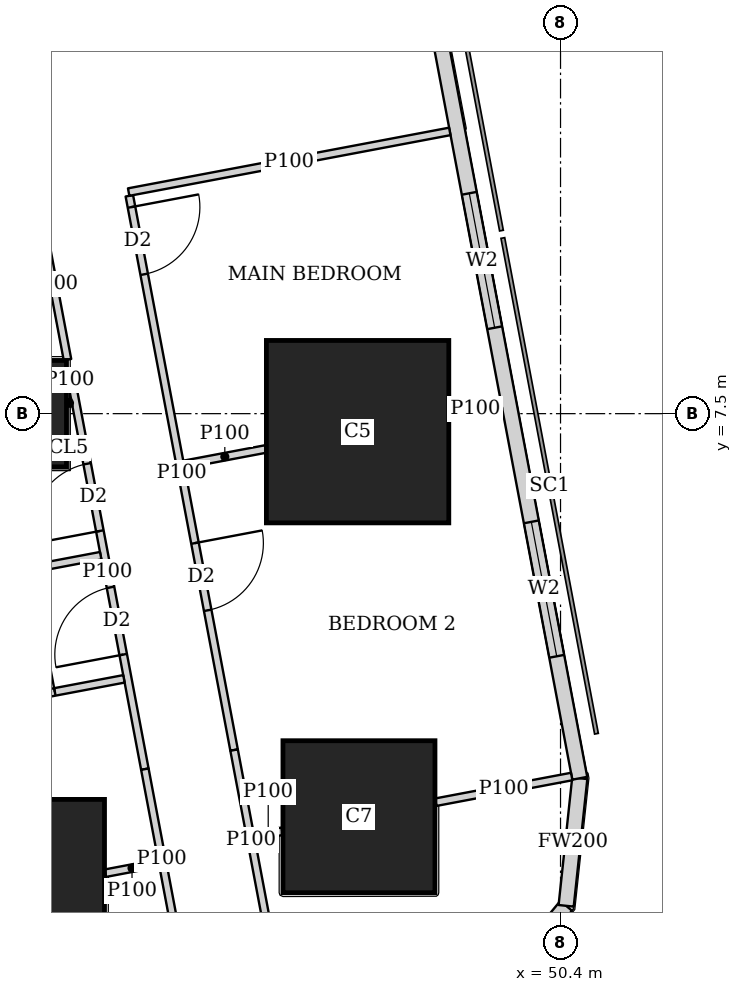
"""IFC4 building model, lengths in metres.
Left out: names, types, materials, properties, quantities, classifications, styles, units other than length and angle.
Written with IfcOpenShell. Run it as: python <this file> out.ifc"""

import sys

from ifc_helpers import new_model, si_unit, direction, frame, frame_2d, origin, origin_2d, place, context, subcontext, project, spatial, rectangle, extrude, element, fill, save


model = new_model("IFC4")
c1 = context("Model", 3, precision=1e-05, world=origin(), true_north=direction((0.0, 1.0)))
c2 = subcontext(c1, "Body", "Model", "MODEL_VIEW")
j1 = project(units=[si_unit("LENGTHUNIT", "METRE"), si_unit("PLANEANGLEUNIT", "RADIAN")], contexts=[c1])
p1 = place(None, origin())
s1 = spatial("IfcSite", under=j1, at=p1, CompositionType="ELEMENT")
p2 = place(p1, origin())
s2 = spatial("IfcBuilding", under=s1, at=p2, CompositionType="ELEMENT")
p3 = place(p2, frame((0.0, 0.0, 204.95)))
s3 = spatial("IfcBuildingStorey", under=s2, at=p3, CompositionType="ELEMENT", Elevation=204.95)
p4 = place(p3, frame((43.2, 1.225, 0.0), z_axis=(0.0, 0.0, 1.0), x_axis=(1.0, 0.0, 0.0)))
e1 = element("IfcColumn", 1, at=p4, inside=s3, PredefinedType="COLUMN", context=c2, shape_type="SweptSolid", body=[
    extrude(rectangle(XDim=2.4, YDim=2.4, at=origin_2d()), origin(), (0.0, 0.0, 1.0), 3.75),
])
p5 = place(p3, frame((47.748, 2.197, 0.0), z_axis=(0.0, 0.0, 1.0), x_axis=(1.0, 0.0, 0.0)))
e2 = element("IfcColumn", 2, at=p5, inside=s3, PredefinedType="COLUMN", context=c2, shape_type="SweptSolid", body=[
    extrude(rectangle(XDim=2.0, YDim=2.0, at=origin_2d()), origin(), (0.0, 0.0, 1.0), 3.75),
])
p6 = place(p3, frame((43.2, 7.5, 0.0), z_axis=(0.0, 0.0, 1.0), x_axis=(1.0, 0.0, 0.0)))
e3 = element("IfcColumn", 3, at=p6, inside=s3, PredefinedType="COLUMN", context=c2, shape_type="SweptSolid", body=[
    extrude(rectangle(XDim=1.4, YDim=1.4, at=origin_2d()), origin(), (0.0, 0.0, 1.0), 3.75),
])
p7 = place(p3, frame((47.73, 7.263, 0.0), z_axis=(0.0, 0.0, 1.0), x_axis=(1.0, 0.0, 0.0)))
e4 = element("IfcColumn", 4, at=p7, inside=s3, PredefinedType="COLUMN", context=c2, shape_type="SweptSolid", body=[
    extrude(rectangle(XDim=2.4, YDim=2.4, at=origin_2d()), origin(), (0.0, 0.0, 1.0), 3.75),
])
p8 = place(p3, frame((49.407, -0.263, 0.0), z_axis=(0.0, 0.0, 1.0), x_axis=(0.638042593423, 0.770001070764, 0.0)))
e5 = element("IfcWall", 5, at=p8, inside=s3, PredefinedType="SOLIDWALL", context=c2, shape_type="SweptSolid", body=[
    extrude(rectangle(XDim=1.673, YDim=0.2, at=frame_2d((0.836, 0.0))), origin(), (0.0, 0.0, 1.0), 3.5),
])
p9 = place(p3, frame((50.474, 1.025, 0.0), z_axis=(0.0, 0.0, 1.0), x_axis=(0.106047815515, 0.994361031429, 0.0)))
e6 = element("IfcWall", 6, at=p9, inside=s3, PredefinedType="SOLIDWALL", context=c2, shape_type="SweptSolid", body=[
    extrude(rectangle(XDim=1.688, YDim=0.2, at=frame_2d((0.844, 0.0))), origin(), (0.0, 0.0, 1.0), 3.5),
])
p10 = place(p3, frame((50.653, 2.703, 0.0), z_axis=(0.0, 0.0, 1.0), x_axis=(-0.185612026696, 0.982623109613, 0.0)))
e7 = element("IfcWall", 7, at=p10, inside=s3, PredefinedType="SOLIDWALL", context=c2, shape_type="SweptSolid", body=[
    extrude(rectangle(XDim=41.393, YDim=0.2, at=frame_2d((20.697, 0.0))), origin(), (0.0, 0.0, 1.0), 3.5),
])
p11 = place(p10, frame((1.633, 0.0, 0.9)))
e8 = element("IfcOpeningElement", 8, at=p11, cuts=e7, PredefinedType="OPENING", context=c2, shape_type="SweptSolid", body=[
    extrude(rectangle(XDim=1.8, YDim=1.5, at=frame_2d((0.9, 0.75))), frame((0.0, 0.11, 0.0), z_axis=(0.0, -1.0, 0.0), x_axis=(1.0, 0.0, 0.0)), (0.0, 0.0, 1.0), 0.22),
])
p12 = place(p10, frame((6.032, 0.0, 0.9)))
e9 = element("IfcOpeningElement", 9, at=p12, cuts=e7, PredefinedType="OPENING", context=c2, shape_type="SweptSolid", body=[
    extrude(rectangle(XDim=1.8, YDim=1.5, at=frame_2d((0.9, 0.75))), frame((0.0, 0.11, 0.0), z_axis=(0.0, -1.0, 0.0), x_axis=(1.0, 0.0, 0.0)), (0.0, 0.0, 1.0), 0.22),
])
p13 = place(p10, frame((9.848, 0.0, 0.9)))
e10 = element("IfcOpeningElement", 10, at=p13, cuts=e7, PredefinedType="OPENING", context=c2, shape_type="SweptSolid", body=[
    extrude(rectangle(XDim=1.8, YDim=1.5, at=frame_2d((0.9, 0.75))), frame((0.0, 0.11, 0.0), z_axis=(0.0, -1.0, 0.0), x_axis=(1.0, 0.0, 0.0)), (0.0, 0.0, 1.0), 0.22),
])
p14 = place(p10, frame((13.664, 0.0, 0.9)))
e11 = element("IfcOpeningElement", 11, at=p14, cuts=e7, PredefinedType="OPENING", context=c2, shape_type="SweptSolid", body=[
    extrude(rectangle(XDim=1.8, YDim=1.5, at=frame_2d((0.9, 0.75))), frame((0.0, 0.11, 0.0), z_axis=(0.0, -1.0, 0.0), x_axis=(1.0, 0.0, 0.0)), (0.0, 0.0, 1.0), 0.22),
])
p15 = place(p10, frame((17.481, 0.0, 0.9)))
e12 = element("IfcOpeningElement", 12, at=p15, cuts=e7, PredefinedType="OPENING", context=c2, shape_type="SweptSolid", body=[
    extrude(rectangle(XDim=1.8, YDim=1.5, at=frame_2d((0.9, 0.75))), frame((0.0, 0.11, 0.0), z_axis=(0.0, -1.0, 0.0), x_axis=(1.0, 0.0, 0.0)), (0.0, 0.0, 1.0), 0.22),
])
p16 = place(p10, frame((21.297, 0.0, 0.9)))
e13 = element("IfcOpeningElement", 13, at=p16, cuts=e7, PredefinedType="OPENING", context=c2, shape_type="SweptSolid", body=[
    extrude(rectangle(XDim=1.8, YDim=1.5, at=frame_2d((0.9, 0.75))), frame((0.0, 0.11, 0.0), z_axis=(0.0, -1.0, 0.0), x_axis=(1.0, 0.0, 0.0)), (0.0, 0.0, 1.0), 0.22),
])
p17 = place(p10, frame((25.113, 0.0, 0.9)))
e14 = element("IfcOpeningElement", 14, at=p17, cuts=e7, PredefinedType="OPENING", context=c2, shape_type="SweptSolid", body=[
    extrude(rectangle(XDim=1.8, YDim=1.5, at=frame_2d((0.9, 0.75))), frame((0.0, 0.11, 0.0), z_axis=(0.0, -1.0, 0.0), x_axis=(1.0, 0.0, 0.0)), (0.0, 0.0, 1.0), 0.22),
])
p18 = place(p10, frame((28.93, 0.0, 0.9)))
e15 = element("IfcOpeningElement", 15, at=p18, cuts=e7, PredefinedType="OPENING", context=c2, shape_type="SweptSolid", body=[
    extrude(rectangle(XDim=1.8, YDim=1.5, at=frame_2d((0.9, 0.75))), frame((0.0, 0.11, 0.0), z_axis=(0.0, -1.0, 0.0), x_axis=(1.0, 0.0, 0.0)), (0.0, 0.0, 1.0), 0.22),
])
p19 = place(p10, frame((32.746, 0.0, 0.9)))
e16 = element("IfcOpeningElement", 16, at=p19, cuts=e7, PredefinedType="OPENING", context=c2, shape_type="SweptSolid", body=[
    extrude(rectangle(XDim=1.8, YDim=1.5, at=frame_2d((0.9, 0.75))), frame((0.0, 0.11, 0.0), z_axis=(0.0, -1.0, 0.0), x_axis=(1.0, 0.0, 0.0)), (0.0, 0.0, 1.0), 0.22),
])
p20 = place(p10, frame((36.481, 0.0, 0.9)))
e17 = element("IfcOpeningElement", 17, at=p20, cuts=e7, PredefinedType="OPENING", context=c2, shape_type="SweptSolid", body=[
    extrude(rectangle(XDim=1.8, YDim=1.5, at=frame_2d((0.9, 0.75))), frame((0.0, 0.11, 0.0), z_axis=(0.0, -1.0, 0.0), x_axis=(1.0, 0.0, 0.0)), (0.0, 0.0, 1.0), 0.22),
])
p21 = place(p3, frame((44.727, 10.366, 0.0), z_axis=(0.0, 0.0, 1.0), x_axis=(0.185678775129, -0.982610498858, 0.0)))
e18 = element("IfcWall", 18, at=p21, inside=s3, PredefinedType="PARTITIONING", context=c2, shape_type="SweptSolid", body=[
    extrude(rectangle(XDim=7.421, YDim=0.1, at=frame_2d((3.71, 0.0))), origin(), (0.0, 0.0, 1.0), 3.5),
])
p22 = place(p21, frame((0.151, 0.0, 0.0)))
e19 = element("IfcOpeningElement", 19, at=p22, cuts=e18, PredefinedType="OPENING", context=c2, shape_type="SweptSolid", body=[
    extrude(rectangle(XDim=0.9, YDim=2.1, at=frame_2d((0.45, 1.05))), frame((0.0, 0.06, 0.0), z_axis=(0.0, -1.0, 0.0), x_axis=(1.0, 0.0, 0.0)), (0.0, 0.0, 1.0), 0.12),
])
p23 = place(p21, frame((4.65, 0.0, 0.0)))
e20 = element("IfcOpeningElement", 20, at=p23, cuts=e18, PredefinedType="OPENING", context=c2, shape_type="SweptSolid", body=[
    extrude(rectangle(XDim=0.9, YDim=2.1, at=frame_2d((0.45, 1.05))), frame((0.0, 0.06, 0.0), z_axis=(0.0, -1.0, 0.0), x_axis=(1.0, 0.0, 0.0)), (0.0, 0.0, 1.0), 0.12),
])
p24 = place(p3, frame((46.105, 3.074, 0.0), z_axis=(0.0, 0.0, 1.0), x_axis=(0.185631845838, -0.982619365681, 0.0)))
e21 = element("IfcWall", 21, at=p24, inside=s3, PredefinedType="PARTITIONING", context=c2, shape_type="SweptSolid", body=[
    extrude(rectangle(XDim=2.403, YDim=0.1, at=frame_2d((1.201, 0.0))), origin(), (0.0, 0.0, 1.0), 2.05),
])
p25 = place(p3, frame((43.539, 10.192, 0.0), z_axis=(0.0, 0.0, 1.0), x_axis=(0.185443145218, -0.982654995353, 0.0)))
e22 = element("IfcWall", 22, at=p25, inside=s3, PredefinedType="PARTITIONING", context=c2, shape_type="SweptSolid", body=[
    extrude(rectangle(XDim=2.017, YDim=0.1, at=frame_2d((1.008, 0.0))), origin(), (0.0, 0.0, 1.0), 3.5),
])
p26 = place(p3, frame((43.949, 8.02, 0.0), z_axis=(0.0, 0.0, 1.0), x_axis=(0.185656792073, -0.982614652627, 0.0)))
e23 = element("IfcWall", 23, at=p26, inside=s3, PredefinedType="PARTITIONING", context=c2, shape_type="SweptSolid", body=[
    extrude(rectangle(XDim=5.289, YDim=0.1, at=frame_2d((2.645, 0.0))), origin(), (0.0, 0.0, 1.0), 3.5),
])
p27 = place(p26, frame((1.2, 0.0, 0.0)))
e24 = element("IfcOpeningElement", 24, at=p27, cuts=e23, PredefinedType="OPENING", context=c2, shape_type="SweptSolid", body=[
    extrude(rectangle(XDim=0.9, YDim=2.1, at=frame_2d((0.45, 1.05))), frame((0.0, 0.06, 0.0), z_axis=(0.0, -1.0, 0.0), x_axis=(1.0, 0.0, 0.0)), (0.0, 0.0, 1.0), 0.12),
])
p28 = place(p26, frame((2.855, 0.0, 0.0)))
e25 = element("IfcOpeningElement", 25, at=p28, cuts=e23, PredefinedType="OPENING", context=c2, shape_type="SweptSolid", body=[
    extrude(rectangle(XDim=0.9, YDim=2.1, at=frame_2d((0.45, 1.05))), frame((0.0, 0.06, 0.0), z_axis=(0.0, -1.0, 0.0), x_axis=(1.0, 0.0, 0.0)), (0.0, 0.0, 1.0), 0.12),
])
p29 = place(p3, frame((44.931, 2.823, 0.0), z_axis=(0.0, 0.0, 1.0), x_axis=(0.185631845838, -0.982619365681, 0.0)))
e26 = element("IfcWall", 26, at=p29, inside=s3, PredefinedType="PARTITIONING", context=c2, shape_type="SweptSolid", body=[
    extrude(rectangle(XDim=2.403, YDim=0.1, at=frame_2d((1.201, 0.0))), origin(), (0.0, 0.0, 1.0), 2.05),
])
p30 = place(p3, frame((48.943, 11.213, 0.0), z_axis=(0.0, 0.0, 1.0), x_axis=(-0.982633535512, -0.185556823879, 0.0)))
e27 = element("IfcWall", 27, at=p30, inside=s3, PredefinedType="PARTITIONING", context=c2, shape_type="SweptSolid", body=[
    extrude(rectangle(XDim=4.3, YDim=0.1, at=frame_2d((2.15, 0.0))), origin(), (0.0, 0.0, 1.0), 2.05),
])
p31 = place(p3, frame((49.622, 7.62, 0.0), z_axis=(0.0, 0.0, 1.0), x_axis=(-0.98254419619, -0.186029305578, 0.0)))
e28 = element("IfcWall", 28, at=p31, inside=s3, PredefinedType="PARTITIONING", context=c2, shape_type="SweptSolid", body=[
    extrude(rectangle(XDim=0.694, YDim=0.1, at=frame_2d((0.347, 0.0))), origin(), (0.0, 0.0, 1.0), 3.5),
])
p32 = place(p3, frame((46.52, 7.035, 0.0), z_axis=(0.0, 0.0, 1.0), x_axis=(-0.982620932907, -0.185623549726, 0.0)))
e29 = element("IfcWall", 29, at=p32, inside=s3, PredefinedType="PARTITIONING", context=c2, shape_type="SweptSolid", body=[
    extrude(rectangle(XDim=1.093, YDim=0.1, at=frame_2d((0.546, 0.0))), origin(), (0.0, 0.0, 1.0), 3.5),
])
p33 = place(p3, frame((50.547, 2.726, 0.0), z_axis=(0.0, 0.0, 1.0), x_axis=(-0.982603988143, -0.185713226471, 0.0)))
e30 = element("IfcWall", 30, at=p33, inside=s3, PredefinedType="PARTITIONING", context=c2, shape_type="SweptSolid", body=[
    extrude(rectangle(XDim=1.821, YDim=0.1, at=frame_2d((0.91, 0.0))), origin(), (0.0, 0.0, 1.0), 2.05),
])
p34 = place(p3, frame((46.738, 2.006, 0.0), z_axis=(0.0, 0.0, 1.0), x_axis=(-0.982820466874, -0.184564161994, 0.0)))
e31 = element("IfcWall", 31, at=p34, inside=s3, PredefinedType="PARTITIONING", context=c2, shape_type="SweptSolid", body=[
    extrude(rectangle(XDim=0.374, YDim=0.1, at=frame_2d((0.187, 0.0))), origin(), (0.0, 0.0, 1.0), 2.05),
])
p35 = place(p3, frame((43.969, 7.646, 0.0), z_axis=(0.0, 0.0, 1.0), x_axis=(-0.983147034646, -0.182816597351, 0.0)))
e32 = element("IfcWall", 32, at=p35, inside=s3, PredefinedType="PARTITIONING", context=c2, shape_type="SweptSolid", body=[
    extrude(rectangle(XDim=0.06, YDim=0.1, at=frame_2d((0.03, 0.0))), origin(), (0.0, 0.0, 1.0), 3.5),
])
p36 = place(p3, frame((45.114, 1.587, 0.0), z_axis=(0.0, 0.0, 1.0), x_axis=(-0.982671022916, -0.185358195723, 0.0)))
e33 = element("IfcWall", 33, at=p36, inside=s3, PredefinedType="PARTITIONING", context=c2, shape_type="SweptSolid", body=[
    extrude(rectangle(XDim=0.717, YDim=0.1, at=frame_2d((0.358, 0.0))), origin(), (0.0, 0.0, 1.0), 2.05),
])
p37 = place(p3, frame((44.35, 5.631, 0.0), z_axis=(0.0, 0.0, 1.0), x_axis=(-0.982638553676, -0.185530247748, 0.0)))
e34 = element("IfcWall", 34, at=p37, inside=s3, PredefinedType="PARTITIONING", context=c2, shape_type="SweptSolid", body=[
    extrude(rectangle(XDim=3.525, YDim=0.1, at=frame_2d((1.763, 0.0))), origin(), (0.0, 0.0, 1.0), 3.5),
])
p38 = place(p3, frame((41.192, 3.356, 0.0), z_axis=(0.0, 0.0, 1.0), x_axis=(0.982588017646, 0.185797706064, 0.0)))
e35 = element("IfcWall", 35, at=p38, inside=s3, PredefinedType="PARTITIONING", context=c2, shape_type="SweptSolid", body=[
    extrude(rectangle(XDim=3.525, YDim=0.1, at=frame_2d((1.763, 0.0))), origin(), (0.0, 0.0, 1.0), 3.5),
])
p39 = place(p38, frame((1.7, 0.0, 0.0)))
e36 = element("IfcOpeningElement", 36, at=p39, cuts=e35, PredefinedType="OPENING", context=c2, shape_type="SweptSolid", body=[
    extrude(rectangle(XDim=0.9, YDim=2.1, at=frame_2d((0.45, 1.05))), frame((0.0, 0.06, 0.0), z_axis=(0.0, -1.0, 0.0), x_axis=(1.0, 0.0, 0.0)), (0.0, 0.0, 1.0), 0.12),
])
p40 = place(p11, origin())
e37 = element("IfcWindow", 37, at=p40, inside=s3, PartitioningType="SINGLE_PANEL", PredefinedType="WINDOW", context=c2, shape_type="SweptSolid", body=[
    extrude(rectangle(XDim=1.8, YDim=1.5, at=frame_2d((0.9, 0.75))), frame((0.0, 0.03, 0.0), z_axis=(0.0, -1.0, 0.0), x_axis=(1.0, 0.0, 0.0)), (0.0, 0.0, 1.0), 0.06),
])
fill(e8, e37)
p41 = place(p12, origin())
e38 = element("IfcWindow", 38, at=p41, inside=s3, PartitioningType="SINGLE_PANEL", PredefinedType="WINDOW", context=c2, shape_type="SweptSolid", body=[
    extrude(rectangle(XDim=1.8, YDim=1.5, at=frame_2d((0.9, 0.75))), frame((0.0, 0.03, 0.0), z_axis=(0.0, -1.0, 0.0), x_axis=(1.0, 0.0, 0.0)), (0.0, 0.0, 1.0), 0.06),
])
fill(e9, e38)
p42 = place(p22, origin())
e39 = element("IfcDoor", 39, at=p42, inside=s3, OperationType="SINGLE_SWING_LEFT", PredefinedType="DOOR", context=c2, shape_type="SweptSolid", body=[
    extrude(rectangle(XDim=0.9, YDim=2.1, at=frame_2d((0.45, 1.05))), frame((0.0, 0.025, 0.0), z_axis=(0.0, -1.0, 0.0), x_axis=(1.0, 0.0, 0.0)), (0.0, 0.0, 1.0), 0.05),
])
fill(e19, e39)
p43 = place(p23, origin())
e40 = element("IfcDoor", 40, at=p43, inside=s3, OperationType="SINGLE_SWING_LEFT", PredefinedType="DOOR", context=c2, shape_type="SweptSolid", body=[
    extrude(rectangle(XDim=0.9, YDim=2.1, at=frame_2d((0.45, 1.05))), frame((0.0, 0.025, 0.0), z_axis=(0.0, -1.0, 0.0), x_axis=(1.0, 0.0, 0.0)), (0.0, 0.0, 1.0), 0.05),
])
fill(e20, e40)
p44 = place(p27, origin())
e41 = element("IfcDoor", 41, at=p44, inside=s3, OperationType="SINGLE_SWING_LEFT", PredefinedType="DOOR", context=c2, shape_type="SweptSolid", body=[
    extrude(rectangle(XDim=0.9, YDim=2.1, at=frame_2d((0.45, 1.05))), frame((0.0, 0.025, 0.0), z_axis=(0.0, -1.0, 0.0), x_axis=(1.0, 0.0, 0.0)), (0.0, 0.0, 1.0), 0.05),
])
fill(e24, e41)
p45 = place(p28, origin())
e42 = element("IfcDoor", 42, at=p45, inside=s3, OperationType="SINGLE_SWING_LEFT", PredefinedType="DOOR", context=c2, shape_type="SweptSolid", body=[
    extrude(rectangle(XDim=0.9, YDim=2.1, at=frame_2d((0.45, 1.05))), frame((0.0, 0.025, 0.0), z_axis=(0.0, -1.0, 0.0), x_axis=(1.0, 0.0, 0.0)), (0.0, 0.0, 1.0), 0.05),
])
fill(e25, e42)
p46 = place(p39, origin())
e43 = element("IfcDoor", 43, at=p46, inside=s3, OperationType="SINGLE_SWING_RIGHT", PredefinedType="DOOR", context=c2, shape_type="SweptSolid", body=[
    extrude(rectangle(XDim=0.9, YDim=2.1, at=frame_2d((0.45, 1.05))), frame((0.0, 0.025, 0.0), z_axis=(0.0, -1.0, 0.0), x_axis=(1.0, 0.0, 0.0)), (0.0, 0.0, 1.0), 0.05),
])
fill(e36, e43)
save(model, sys.argv[1])
